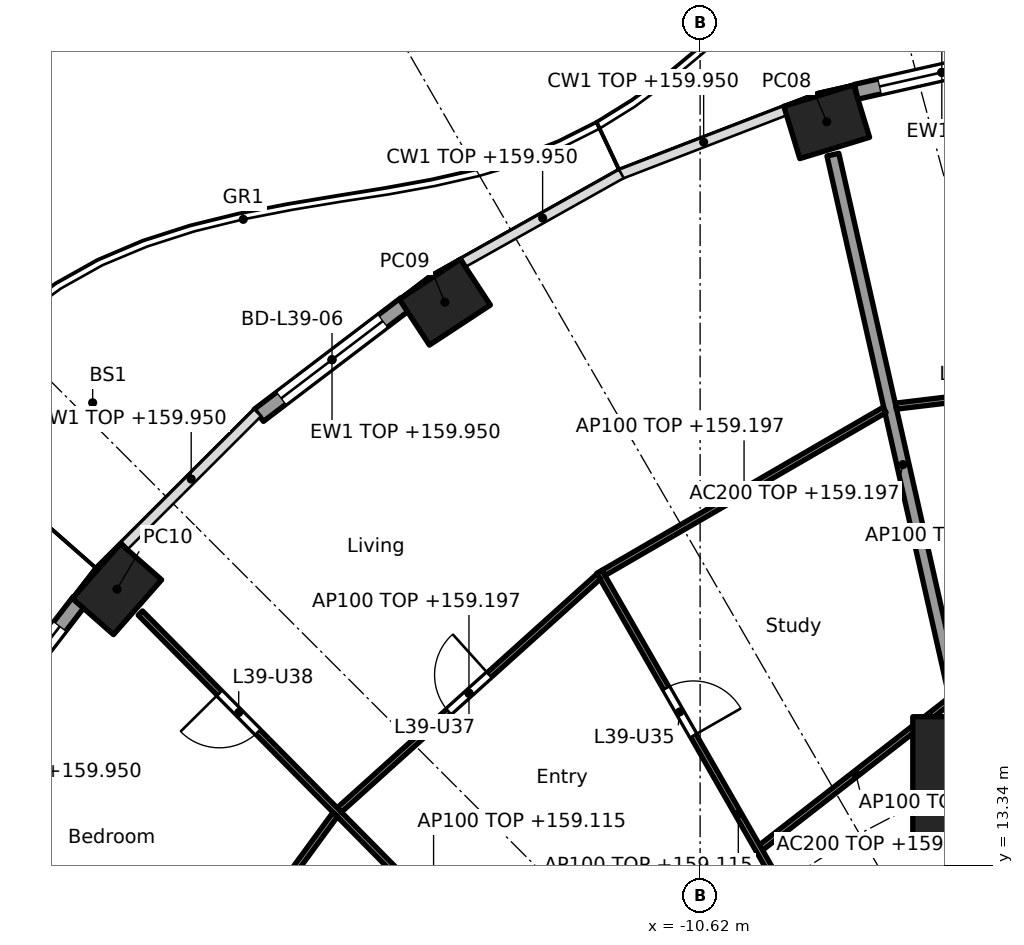
"""IFC4 building model, lengths in metres.
Left out: names, types, materials, properties, quantities, classifications, styles, units other than length and angle.
Written with IfcOpenShell. Run it as: python <this file> out.ifc"""

import sys

from ifc_helpers import new_model, si_unit, direction, frame, frame_2d, origin, origin_2d, place, context, subcontext, project, spatial, rectangle, hollow_rectangle, extrude, element, fill, save


model = new_model("IFC4")
c1 = context("Model", 3, precision=1e-05, world=origin(), true_north=direction((0.0, 1.0)))
c2 = subcontext(c1, "Body", "Model", "MODEL_VIEW")
j1 = project(units=[si_unit("LENGTHUNIT", "METRE"), si_unit("PLANEANGLEUNIT", "RADIAN")], contexts=[c1])
p1 = place(None, origin())
s1 = spatial("IfcSite", under=j1, at=p1, CompositionType="ELEMENT")
p2 = place(p1, origin())
s2 = spatial("IfcBuilding", under=s1, at=p2, CompositionType="ELEMENT")
p3 = place(p2, frame((0.0, 0.0, 156.6)))
s3 = spatial("IfcBuildingStorey", under=s2, at=p3, CompositionType="ELEMENT", Elevation=156.6)
for number, where, z_axis, x_axis in (
    (1, (-8.538, 25.565, 0.0), (0.0, 0.0, 1.0), (-0.957, -0.292, 0.0)),
    (2, (-14.817, 22.599, 0.0), (0.0, 0.0, 1.0), (-0.836, -0.549, 0.0)),
    (3, (-20.209, 17.88, 0.0), (0.0, 0.0, 1.0), (-0.66, -0.751, 0.0)),
):
    element("IfcColumn", number, at=place(p3, frame(where, z_axis=z_axis, x_axis=x_axis)), inside=s3, PredefinedType="COLUMN", context=c2, shape_type="SweptSolid", body=[
        extrude(hollow_rectangle(XDim=1.2, YDim=0.9, WallThickness=0.04, at=origin_2d()), origin(), (0.0, 0.0, 1.0), 3.7),
    ])
p4 = place(p3, frame((-6.123, 14.782, 0.0), z_axis=(0.0, 0.0, 1.0), x_axis=(1.0, 0.0, 0.0)))
e4 = element("IfcColumn", 4, at=p4, inside=s3, PredefinedType="COLUMN", context=c2, shape_type="SweptSolid", body=[
    extrude(rectangle(XDim=2.0, YDim=2.0, at=origin_2d()), origin(), (0.0, 0.0, 1.0), 3.7),
])
p5 = place(p3, frame((-8.055, 26.059, 0.0), z_axis=(0.0, 0.0, 1.0), x_axis=(0.975339035722, 0.220711951186, 0.0)))
e5 = element("IfcWall", 5, at=p5, inside=s3, PredefinedType="SOLIDWALL", context=c2, shape_type="SweptSolid", body=[
    extrude(rectangle(XDim=2.89, YDim=0.25, at=frame_2d((1.445, 0.0))), origin(), (0.0, 0.0, 1.0), 3.35),
])
p6 = place(p5, frame((0.395, 0.0, 0.0)))
e6 = element("IfcOpeningElement", 6, at=p6, cuts=e5, PredefinedType="OPENING", context=c2, shape_type="SweptSolid", body=[
    extrude(rectangle(XDim=2.1, YDim=2.4, at=frame_2d((1.05, 1.2))), frame((0.0, 0.135, 0.0), z_axis=(0.0, -1.0, 0.0), x_axis=(1.0, 0.0, 0.0)), (0.0, 0.0, 1.0), 0.27),
])
p7 = place(p3, frame((-17.878, 20.738, 0.0), z_axis=(0.0, 0.0, 1.0), x_axis=(0.796022231079, 0.605267385233, 0.0)))
e7 = element("IfcWall", 7, at=p7, inside=s3, PredefinedType="SOLIDWALL", context=c2, shape_type="SweptSolid", body=[
    extrude(rectangle(XDim=3.026, YDim=0.25, at=frame_2d((1.513, 0.0))), origin(), (0.0, 0.0, 1.0), 3.35),
])
p8 = place(p7, frame((0.463, 0.0, 0.0)))
e8 = element("IfcOpeningElement", 8, at=p8, cuts=e7, PredefinedType="OPENING", context=c2, shape_type="SweptSolid", body=[
    extrude(rectangle(XDim=2.1, YDim=2.4, at=frame_2d((1.05, 1.2))), frame((0.0, 0.135, 0.0), z_axis=(0.0, -1.0, 0.0), x_axis=(1.0, 0.0, 0.0)), (0.0, 0.0, 1.0), 0.27),
])
p9 = place(p3, frame((-22.753, 15.188, 0.0), z_axis=(0.0, 0.0, 1.0), x_axis=(0.610429847179, 0.792070326217, 0.0)))
e9 = element("IfcWall", 9, at=p9, inside=s3, PredefinedType="SOLIDWALL", context=c2, shape_type="SweptSolid", body=[
    extrude(rectangle(XDim=3.149, YDim=0.25, at=frame_2d((1.575, 0.0))), origin(), (0.0, 0.0, 1.0), 3.35),
])
p10 = place(p9, frame((0.525, 0.0, 0.0)))
e10 = element("IfcOpeningElement", 10, at=p10, cuts=e9, PredefinedType="OPENING", context=c2, shape_type="SweptSolid", body=[
    extrude(rectangle(XDim=2.1, YDim=2.4, at=frame_2d((1.05, 1.2))), frame((0.0, 0.135, 0.0), z_axis=(0.0, -1.0, 0.0), x_axis=(1.0, 0.0, 0.0)), (0.0, 0.0, 1.0), 0.27),
])
p11 = place(p3, frame((-6.134, 14.831, 0.0), z_axis=(0.0, 0.0, 1.0), x_axis=(-0.220337590808, 0.975423675167, 0.0)))
e11 = element("IfcWall", 11, at=p11, inside=s3, PredefinedType="PARTITIONING", context=c2, shape_type="SweptSolid", body=[
    extrude(rectangle(XDim=10.451, YDim=0.2, at=frame_2d((5.226, 0.0))), origin(), (0.0, 0.0, 1.0), 2.597),
])
p12 = place(p3, frame((-1.825, 21.557, 0.0), z_axis=(0.0, 0.0, 1.0), x_axis=(-0.992915053711, -0.11882632753, 0.0)))
e12 = element("IfcWall", 12, at=p12, inside=s3, PredefinedType="PARTITIONING", context=c2, shape_type="SweptSolid", body=[
    extrude(rectangle(XDim=5.615, YDim=0.1, at=frame_2d((2.808, 0.0))), origin(), (0.0, 0.0, 1.0), 2.597),
])
p13 = place(p12, frame((3.774, 0.0, 0.0)))
e13 = element("IfcOpeningElement", 13, at=p13, cuts=e12, PredefinedType="OPENING", context=c2, shape_type="SweptSolid", body=[
    extrude(rectangle(XDim=0.9, YDim=2.1, at=frame_2d((0.45, 1.05))), frame((0.0, 0.06, 0.0), z_axis=(0.0, -1.0, 0.0), x_axis=(1.0, 0.0, 0.0)), (0.0, 0.0, 1.0), 0.12),
])
p14 = place(p3, frame((-6.503, 16.054, 0.0), z_axis=(0.0, 0.0, 1.0), x_axis=(-0.789428807693, -0.613842127574, 0.0)))
e14 = element("IfcWall", 14, at=p14, inside=s3, PredefinedType="PARTITIONING", context=c2, shape_type="SweptSolid", body=[
    extrude(rectangle(XDim=3.948, YDim=0.1, at=frame_2d((1.974, 0.0))), origin(), (0.0, 0.0, 1.0), 2.597),
])
p15 = place(p3, frame((-7.586, 20.827, 0.0), z_axis=(0.0, 0.0, 1.0), x_axis=(-0.865093450578, -0.501610727325, 0.0)))
e15 = element("IfcWall", 15, at=p15, inside=s3, PredefinedType="PARTITIONING", context=c2, shape_type="SweptSolid", body=[
    extrude(rectangle(XDim=5.343, YDim=0.1, at=frame_2d((2.671, 0.0))), origin(), (0.0, 0.0, 1.0), 2.597),
])
p16 = place(p3, frame((-7.708, 10.198, 0.0), z_axis=(0.0, 0.0, 1.0), x_axis=(-0.497449462689, 0.867492957937, 0.0)))
e16 = element("IfcWall", 16, at=p16, inside=s3, PredefinedType="PARTITIONING", context=c2, shape_type="SweptSolid", body=[
    extrude(rectangle(XDim=9.185, YDim=0.1, at=frame_2d((4.592, 0.0))), origin(), (0.0, 0.0, 1.0), 2.515),
])
p17 = place(p16, frame((1.511, 0.0, 0.0)))
e17 = element("IfcOpeningElement", 17, at=p17, cuts=e16, PredefinedType="OPENING", context=c2, shape_type="SweptSolid", body=[
    extrude(rectangle(XDim=0.9, YDim=2.1, at=frame_2d((0.45, 1.05))), frame((0.0, 0.06, 0.0), z_axis=(0.0, -1.0, 0.0), x_axis=(1.0, 0.0, 0.0)), (0.0, 0.0, 1.0), 0.12),
])
p18 = place(p16, frame((6.078, 0.0, 0.0)))
e18 = element("IfcOpeningElement", 18, at=p18, cuts=e16, PredefinedType="OPENING", context=c2, shape_type="SweptSolid", body=[
    extrude(rectangle(XDim=0.9, YDim=2.1, at=frame_2d((0.45, 1.05))), frame((0.0, 0.06, 0.0), z_axis=(0.0, -1.0, 0.0), x_axis=(1.0, 0.0, 0.0)), (0.0, 0.0, 1.0), 0.12),
])
p19 = place(p3, frame((-12.289, 18.089, 0.0), z_axis=(0.0, 0.0, 1.0), x_axis=(-0.743146066164, -0.669129228435, 0.0)))
e19 = element("IfcWall", 19, at=p19, inside=s3, PredefinedType="PARTITIONING", context=c2, shape_type="SweptSolid", body=[
    extrude(rectangle(XDim=5.739, YDim=0.1, at=frame_2d((2.87, 0.0))), origin(), (0.0, 0.0, 1.0), 2.597),
])
p20 = place(p19, frame((2.42, 0.0, 0.0)))
e20 = element("IfcOpeningElement", 20, at=p20, cuts=e19, PredefinedType="OPENING", context=c2, shape_type="SweptSolid", body=[
    extrude(rectangle(XDim=0.9, YDim=2.1, at=frame_2d((0.45, 1.05))), frame((0.0, 0.06, 0.0), z_axis=(0.0, -1.0, 0.0), x_axis=(1.0, 0.0, 0.0)), (0.0, 0.0, 1.0), 0.12),
])
p21 = place(p3, frame((-10.182, 7.729, 0.0), z_axis=(0.0, 0.0, 1.0), x_axis=(-0.702930219229, 0.7112588185, 0.0)))
e21 = element("IfcWall", 21, at=p21, inside=s3, PredefinedType="PARTITIONING", context=c2, shape_type="SweptSolid", body=[
    extrude(rectangle(XDim=13.719, YDim=0.1, at=frame_2d((6.859, 0.0))), origin(), (0.0, 0.0, 1.0), 2.515),
])
p22 = place(p21, frame((1.507, 0.0, 0.0)))
e22 = element("IfcOpeningElement", 22, at=p22, cuts=e21, PredefinedType="OPENING", context=c2, shape_type="SweptSolid", body=[
    extrude(rectangle(XDim=0.9, YDim=2.1, at=frame_2d((0.45, 1.05))), frame((0.0, 0.06, 0.0), z_axis=(0.0, -1.0, 0.0), x_axis=(1.0, 0.0, 0.0)), (0.0, 0.0, 1.0), 0.12),
])
p23 = place(p21, frame((6.067, 0.0, 0.0)))
e23 = element("IfcOpeningElement", 23, at=p23, cuts=e21, PredefinedType="OPENING", context=c2, shape_type="SweptSolid", body=[
    extrude(rectangle(XDim=0.9, YDim=2.1, at=frame_2d((0.45, 1.05))), frame((0.0, 0.06, 0.0), z_axis=(0.0, -1.0, 0.0), x_axis=(1.0, 0.0, 0.0)), (0.0, 0.0, 1.0), 0.12),
])
p24 = place(p21, frame((10.969, 0.0, 0.0)))
e24 = element("IfcOpeningElement", 24, at=p24, cuts=e21, PredefinedType="OPENING", context=c2, shape_type="SweptSolid", body=[
    extrude(rectangle(XDim=0.9, YDim=2.1, at=frame_2d((0.45, 1.05))), frame((0.0, 0.06, 0.0), z_axis=(0.0, -1.0, 0.0), x_axis=(1.0, 0.0, 0.0)), (0.0, 0.0, 1.0), 0.12),
])
p25 = place(p3, frame((-16.621, 14.174, 0.0), z_axis=(0.0, 0.0, 1.0), x_axis=(-0.590672767272, -0.806911198338, 0.0)))
e25 = element("IfcWall", 25, at=p25, inside=s3, PredefinedType="PARTITIONING", context=c2, shape_type="SweptSolid", body=[
    extrude(rectangle(XDim=6.099, YDim=0.1, at=frame_2d((3.05, 0.0))), origin(), (0.0, 0.0, 1.0), 2.597),
])
p26 = place(p25, frame((4.074, 0.0, 0.0)))
e26 = element("IfcOpeningElement", 26, at=p26, cuts=e25, PredefinedType="OPENING", context=c2, shape_type="SweptSolid", body=[
    extrude(rectangle(XDim=0.9, YDim=2.1, at=frame_2d((0.45, 1.05))), frame((0.0, 0.06, 0.0), z_axis=(0.0, -1.0, 0.0), x_axis=(1.0, 0.0, 0.0)), (0.0, 0.0, 1.0), 0.12),
])
p27 = place(p6, origin())
e27 = element("IfcDoor", 27, at=p27, inside=s3, OperationType="SLIDING_TO_LEFT", PredefinedType="DOOR", context=c2, shape_type="SweptSolid", body=[
    extrude(rectangle(XDim=2.1, YDim=2.4, at=frame_2d((1.05, 1.2))), frame((0.0, 0.025, 0.0), z_axis=(0.0, -1.0, 0.0), x_axis=(1.0, 0.0, 0.0)), (0.0, 0.0, 1.0), 0.05),
])
fill(e6, e27)
p28 = place(p8, origin())
e28 = element("IfcDoor", 28, at=p28, inside=s3, OperationType="SLIDING_TO_LEFT", PredefinedType="DOOR", context=c2, shape_type="SweptSolid", body=[
    extrude(rectangle(XDim=2.1, YDim=2.4, at=frame_2d((1.05, 1.2))), frame((0.0, 0.025, 0.0), z_axis=(0.0, -1.0, 0.0), x_axis=(1.0, 0.0, 0.0)), (0.0, 0.0, 1.0), 0.05),
])
fill(e8, e28)
p29 = place(p10, origin())
e29 = element("IfcDoor", 29, at=p29, inside=s3, OperationType="SLIDING_TO_LEFT", PredefinedType="DOOR", context=c2, shape_type="SweptSolid", body=[
    extrude(rectangle(XDim=2.1, YDim=2.4, at=frame_2d((1.05, 1.2))), frame((0.0, 0.025, 0.0), z_axis=(0.0, -1.0, 0.0), x_axis=(1.0, 0.0, 0.0)), (0.0, 0.0, 1.0), 0.05),
])
fill(e10, e29)
p30 = place(p18, frame((0.9, 0.0, 0.0), x_axis=(-1.0, 0.0, 0.0)))
e30 = element("IfcDoor", 30, at=p30, inside=s3, OperationType="SINGLE_SWING_RIGHT", PredefinedType="DOOR", context=c2, shape_type="SweptSolid", body=[
    extrude(rectangle(XDim=0.9, YDim=2.1, at=frame_2d((0.45, 1.05))), frame((0.0, 0.025, 0.0), z_axis=(0.0, -1.0, 0.0), x_axis=(1.0, 0.0, 0.0)), (0.0, 0.0, 1.0), 0.05),
])
fill(e18, e30)
p31 = place(p20, frame((0.9, 0.0, 0.0), x_axis=(-1.0, 0.0, 0.0)))
e31 = element("IfcDoor", 31, at=p31, inside=s3, OperationType="SINGLE_SWING_RIGHT", PredefinedType="DOOR", context=c2, shape_type="SweptSolid", body=[
    extrude(rectangle(XDim=0.9, YDim=2.1, at=frame_2d((0.45, 1.05))), frame((0.0, 0.025, 0.0), z_axis=(0.0, -1.0, 0.0), x_axis=(1.0, 0.0, 0.0)), (0.0, 0.0, 1.0), 0.05),
])
fill(e20, e31)
p32 = place(p24, origin())
e32 = element("IfcDoor", 32, at=p32, inside=s3, OperationType="SINGLE_SWING_RIGHT", PredefinedType="DOOR", context=c2, shape_type="SweptSolid", body=[
    extrude(rectangle(XDim=0.9, YDim=2.1, at=frame_2d((0.45, 1.05))), frame((0.0, 0.025, 0.0), z_axis=(0.0, -1.0, 0.0), x_axis=(1.0, 0.0, 0.0)), (0.0, 0.0, 1.0), 0.05),
])
fill(e24, e32)
save(model, sys.argv[1])
